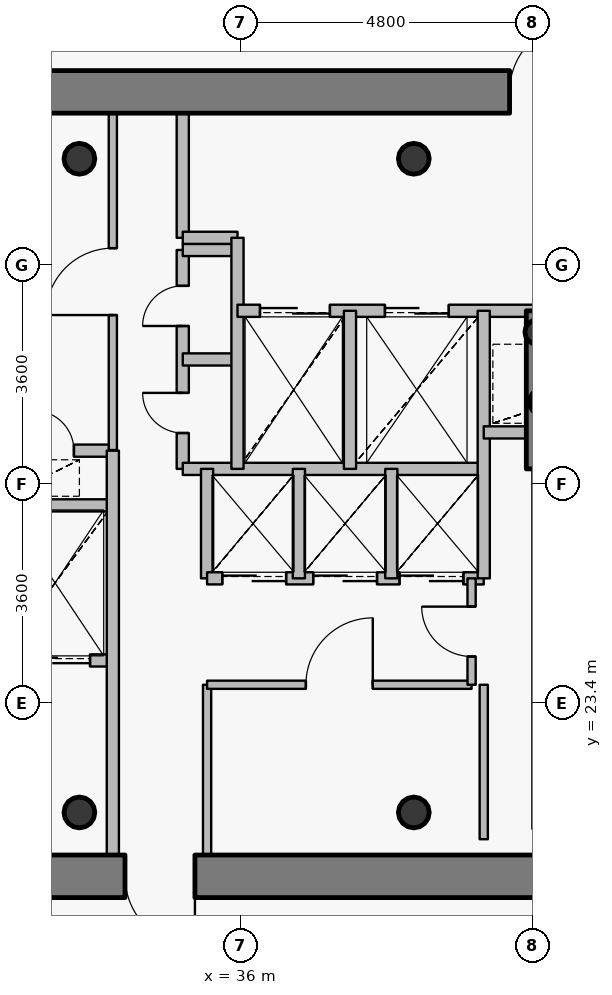
"""IFC4 building model, lengths in metres.
Left out: names, types, materials, properties, quantities, classifications, styles, units other than length and angle.
Written with IfcOpenShell. Run it as: python <this file> out.ifc"""

import sys

from ifc_helpers import new_model, si_unit, direction, frame, frame_2d, origin, origin_2d, place, context, subcontext, project, spatial, rectangle, hollow_circle, extrude, source, transform, mapped, element, fill, save


model = new_model("IFC4")
c1 = context("Model", 3, precision=1e-05, world=origin(), true_north=direction((0.0, 1.0)))
c2 = subcontext(c1, "Body", "Model", "MODEL_VIEW")
j1 = project(units=[si_unit("LENGTHUNIT", "METRE"), si_unit("PLANEANGLEUNIT", "RADIAN")], contexts=[c1])
p1 = place(None, origin())
s1 = spatial("IfcSite", under=j1, at=p1, CompositionType="ELEMENT")
p2 = place(p1, origin())
s2 = spatial("IfcBuilding", under=s1, at=p2, CompositionType="ELEMENT")
p3 = place(p2, frame((0.0, 0.0, 291.75)))
s3 = spatial("IfcBuildingStorey", under=s2, at=p3, CompositionType="ELEMENT", Elevation=291.75)
for number, where, z_axis, x_axis in (
    (1, (33.35, 21.6, 0.0), (0.0, 0.0, 1.0), (1.0, 0.0, 0.0)),
    (2, (38.85, 21.6, 0.0), (0.0, 0.0, 1.0), (1.0, 0.0, 0.0)),
    (3, (38.85, 32.35, 0.0), (0.0, 0.0, 1.0), (1.0, 0.0, 0.0)),
    (4, (33.35, 32.35, 0.0), (0.0, 0.0, 1.0), (1.0, 0.0, 0.0)),
):
    element("IfcColumn", number, at=place(p3, frame(where, z_axis=z_axis, x_axis=x_axis)), inside=s3, PredefinedType="COLUMN", context=c2, shape_type="SweptSolid", body=[
        extrude(hollow_circle(Radius=0.254, WallThickness=0.02, at=origin_2d()), origin(), (0.0, 0.0, 1.0), 3.75),
    ])
for number, where, z_axis, x_axis in (
    (5, (40.95, 28.35, 0.0), (0.0, 0.0, 1.0), (1.0, 0.0, 0.0)),
    (6, (40.88, 29.5, 0.0), (0.0, 0.0, 1.0), (1.0, 0.0, 0.0)),
):
    element("IfcColumn", number, at=place(p3, frame(where, z_axis=z_axis, x_axis=x_axis)), inside=s3, PredefinedType="COLUMN", context=c2, shape_type="SweptSolid", body=[
        extrude(hollow_circle(Radius=0.203, WallThickness=0.016, at=origin_2d()), origin(), (0.0, 0.0, 1.0), 3.75),
    ])
p4 = place(p3, frame((27.65, 33.45, 0.0), z_axis=(0.0, 0.0, 1.0), x_axis=(1.0, 0.0, 0.0)))
e7 = element("IfcWall", 7, at=p4, inside=s3, PredefinedType="SHEAR", context=c2, shape_type="SweptSolid", body=[
    extrude(rectangle(XDim=16.7, YDim=0.7, at=frame_2d((8.35, 0.0))), origin(), (0.0, 0.0, 1.0), 3.05),
])
p5 = place(p4, frame((12.775, 0.0, 0.0)))
e8 = element("IfcOpeningElement", 8, at=p5, cuts=e7, PredefinedType="OPENING", context=c2, shape_type="SweptSolid", body=[
    extrude(rectangle(XDim=1.15, YDim=2.15, at=origin_2d()), frame((0.575, 0.36, 1.075), z_axis=(0.0, -1.0, 0.0), x_axis=(1.0, 0.0, 0.0)), (0.0, 0.0, 1.0), 0.72),
])
p6 = place(p3, frame((44.35, 20.55, 0.0), z_axis=(0.0, 0.0, 1.0), x_axis=(-1.0, 0.0, 0.0)))
e9 = element("IfcWall", 9, at=p6, inside=s3, PredefinedType="SHEAR", context=c2, shape_type="SweptSolid", body=[
    extrude(rectangle(XDim=16.7, YDim=0.7, at=frame_2d((8.35, 0.0))), origin(), (0.0, 0.0, 1.0), 3.05),
])
p7 = place(p6, frame((12.925, 0.0, 0.0)))
e10 = element("IfcOpeningElement", 10, at=p7, cuts=e9, PredefinedType="OPENING", context=c2, shape_type="SweptSolid", body=[
    extrude(rectangle(XDim=1.15, YDim=2.15, at=origin_2d()), frame((0.575, 0.36, 1.075), z_axis=(0.0, -1.0, 0.0), x_axis=(1.0, 0.0, 0.0)), (0.0, 0.0, 1.0), 0.72),
])
p8 = place(p6, frame((9.1, 0.0, 0.0)))
e11 = element("IfcOpeningElement", 11, at=p8, cuts=e9, PredefinedType="OPENING", context=c2, shape_type="SweptSolid", body=[
    extrude(rectangle(XDim=1.15, YDim=2.15, at=origin_2d()), frame((0.575, 0.36, 1.075), z_axis=(0.0, -1.0, 0.0), x_axis=(1.0, 0.0, 0.0)), (0.0, 0.0, 1.0), 0.72),
])
p9 = place(p3, frame((40.9, 27.25, 0.0), z_axis=(0.0, 0.0, 1.0), x_axis=(0.0, 1.0, 0.0)))
e12 = element("IfcWall", 12, at=p9, inside=s3, PredefinedType="SHEAR", context=c2, shape_type="SweptSolid", body=[
    extrude(rectangle(XDim=2.6, YDim=0.4, at=frame_2d((1.3, 0.0))), origin(), (0.0, 0.0, 1.0), 3.1),
])
p10 = place(p3, frame((31.1, 27.55, 0.0), z_axis=(0.0, 0.0, 1.0), x_axis=(1.0, 0.0, 0.0)))
e13 = element("IfcWall", 13, at=p10, inside=s3, PredefinedType="PARTITIONING", context=c2, shape_type="SweptSolid", body=[
    extrude(rectangle(XDim=2.8, YDim=0.2, at=frame_2d((1.4, 0.0))), origin(), (0.0, 0.0, 1.0), 3.085),
])
p11 = place(p10, frame((1.5, 0.0, 0.0)))
e14 = element("IfcOpeningElement", 14, at=p11, cuts=e13, PredefinedType="OPENING", context=c2, shape_type="SweptSolid", body=[
    extrude(rectangle(XDim=0.66, YDim=2.05, at=origin_2d()), frame((0.33, 0.11, 1.025), z_axis=(0.0, -1.0, 0.0), x_axis=(1.0, 0.0, 0.0)), (0.0, 0.0, 1.0), 0.22),
])
p12 = place(p3, frame((32.0, 24.1, 0.0), z_axis=(0.0, 0.0, 1.0), x_axis=(1.0, 0.0, 0.0)))
e15 = element("IfcWall", 15, at=p12, inside=s3, PredefinedType="PARTITIONING", context=c2, shape_type="SweptSolid", body=[
    extrude(rectangle(XDim=1.9, YDim=0.2, at=frame_2d((0.95, 0.0))), origin(), (0.0, 0.0, 1.0), 3.085),
])
p13 = place(p12, frame((0.375, 0.0, 0.0)))
e16 = element("IfcOpeningElement", 16, at=p13, cuts=e15, PredefinedType="OPENING", context=c2, shape_type="SweptSolid", body=[
    extrude(rectangle(XDim=1.15, YDim=2.15, at=origin_2d()), frame((0.575, 0.11, 1.075), z_axis=(0.0, -1.0, 0.0), x_axis=(1.0, 0.0, 0.0)), (0.0, 0.0, 1.0), 0.22),
])
p14 = place(p3, frame((32.0, 26.65, 0.0), z_axis=(0.0, 0.0, 1.0), x_axis=(1.0, 0.0, 0.0)))
e17 = element("IfcWall", 17, at=p14, inside=s3, PredefinedType="PARTITIONING", context=c2, shape_type="SweptSolid", body=[
    extrude(rectangle(XDim=1.9, YDim=0.2, at=frame_2d((0.95, 0.0))), origin(), (0.0, 0.0, 1.0), 3.085),
])
p15 = place(p3, frame((33.9, 20.9, 0.0), z_axis=(0.0, 0.0, 1.0), x_axis=(0.0, 1.0, 0.0)))
e18 = element("IfcWall", 18, at=p15, inside=s3, PredefinedType="PARTITIONING", context=c2, shape_type="SweptSolid", body=[
    extrude(rectangle(XDim=6.65, YDim=0.2, at=frame_2d((3.325, 0.0))), origin(), (0.0, 0.0, 1.0), 3.085),
])
p16 = place(p3, frame((33.9, 27.56, 0.0), z_axis=(0.0, 0.0, 1.0), x_axis=(0.0, 1.0, 0.0)))
e19 = element("IfcWall", 19, at=p16, inside=s3, PredefinedType="PARTITIONING", context=c2, shape_type="SweptSolid", body=[
    extrude(rectangle(XDim=5.54, YDim=0.135, at=frame_2d((2.77, 0.0))), origin(), (0.0, 0.0, 1.0), 3.085),
])
p17 = place(p16, frame((2.22, 0.0, 0.0)))
e20 = element("IfcOpeningElement", 20, at=p17, cuts=e19, PredefinedType="OPENING", context=c2, shape_type="SweptSolid", body=[
    extrude(rectangle(XDim=1.1, YDim=2.15, at=origin_2d()), frame((0.55, 0.078, 1.075), z_axis=(0.0, -1.0, 0.0), x_axis=(1.0, 0.0, 0.0)), (0.0, 0.0, 1.0), 0.155),
])
p18 = place(p3, frame((35.05, 27.25, 0.0), z_axis=(0.0, 0.0, 1.0), x_axis=(0.0, 1.0, 0.0)))
e21 = element("IfcWall", 21, at=p18, inside=s3, PredefinedType="PARTITIONING", context=c2, shape_type="SweptSolid", body=[
    extrude(rectangle(XDim=3.6, YDim=0.2, at=frame_2d((1.8, 0.0))), origin(), (0.0, 0.0, 1.0), 3.5),
])
p19 = place(p18, frame((0.59, 0.0, 0.0)))
e22 = element("IfcOpeningElement", 22, at=p19, cuts=e21, PredefinedType="OPENING", context=c2, shape_type="SweptSolid", body=[
    extrude(rectangle(XDim=0.66, YDim=2.05, at=origin_2d()), frame((0.33, 0.11, 1.025), z_axis=(0.0, -1.0, 0.0), x_axis=(1.0, 0.0, 0.0)), (0.0, 0.0, 1.0), 0.22),
])
p20 = place(p18, frame((2.35, 0.0, 0.0)))
e23 = element("IfcOpeningElement", 23, at=p20, cuts=e21, PredefinedType="OPENING", context=c2, shape_type="SweptSolid", body=[
    extrude(rectangle(XDim=0.66, YDim=2.05, at=origin_2d()), frame((0.33, 0.11, 1.025), z_axis=(0.0, -1.0, 0.0), x_axis=(1.0, 0.0, 0.0)), (0.0, 0.0, 1.0), 0.22),
])
p21 = place(p3, frame((35.05, 27.25, 0.0), z_axis=(0.0, 0.0, 1.0), x_axis=(1.0, 0.0, 0.0)))
e24 = element("IfcWall", 24, at=p21, inside=s3, PredefinedType="PARTITIONING", context=c2, shape_type="SweptSolid", body=[
    extrude(rectangle(XDim=4.95, YDim=0.2, at=frame_2d((2.475, 0.0))), origin(), (0.0, 0.0, 1.0), 3.085),
])
for number, where, z_axis, x_axis in (
    (25, (35.05, 29.05, 0.0), (0.0, 0.0, 1.0), (1.0, 0.0, 0.0)),
    (26, (35.05, 30.85, 0.0), (0.0, 0.0, 1.0), (1.0, 0.0, 0.0)),
):
    element("IfcWall", number, at=place(p3, frame(where, z_axis=z_axis, x_axis=x_axis)), inside=s3, PredefinedType="PARTITIONING", context=c2, shape_type="SweptSolid", body=[
        extrude(rectangle(XDim=0.9, YDim=0.2, at=frame_2d((0.45, 0.0))), origin(), (0.0, 0.0, 1.0), 3.5),
    ])
p22 = place(p3, frame((35.05, 31.05, 0.0), z_axis=(0.0, 0.0, 1.0), x_axis=(0.0, 1.0, 0.0)))
e27 = element("IfcWall", 27, at=p22, inside=s3, PredefinedType="PARTITIONING", context=c2, shape_type="SweptSolid", body=[
    extrude(rectangle(XDim=2.05, YDim=0.2, at=frame_2d((1.025, 0.0))), origin(), (0.0, 0.0, 1.0), 3.085),
])
p23 = place(p3, frame((35.05, 31.05, 0.0), z_axis=(0.0, 0.0, 1.0), x_axis=(1.0, 0.0, 0.0)))
e28 = element("IfcWall", 28, at=p23, inside=s3, PredefinedType="PARTITIONING", context=c2, shape_type="SweptSolid", body=[
    extrude(rectangle(XDim=0.9, YDim=0.2, at=frame_2d((0.45, 0.0))), origin(), (0.0, 0.0, 1.0), 3.5),
])
p24 = place(p3, frame((35.45, 20.9, 0.0), z_axis=(0.0, 0.0, 1.0), x_axis=(0.0, 1.0, 0.0)))
e29 = element("IfcWall", 29, at=p24, inside=s3, PredefinedType="PARTITIONING", context=c2, shape_type="SweptSolid", body=[
    extrude(rectangle(XDim=2.8, YDim=0.135, at=frame_2d((1.4, 0.0))), origin(), (0.0, 0.0, 1.0), 3.085),
])
p25 = place(p3, frame((35.45, 23.7, 0.0), z_axis=(0.0, 0.0, 1.0), x_axis=(1.0, 0.0, 0.0)))
e30 = element("IfcWall", 30, at=p25, inside=s3, PredefinedType="PARTITIONING", context=c2, shape_type="SweptSolid", body=[
    extrude(rectangle(XDim=4.35, YDim=0.135, at=frame_2d((2.175, 0.0))), origin(), (0.0, 0.0, 1.0), 3.085),
])
p26 = place(p25, frame((1.625, 0.0, 0.0)))
e31 = element("IfcOpeningElement", 31, at=p26, cuts=e30, PredefinedType="OPENING", context=c2, shape_type="SweptSolid", body=[
    extrude(rectangle(XDim=1.1, YDim=2.15, at=origin_2d()), frame((0.55, 0.078, 1.075), z_axis=(0.0, -1.0, 0.0), x_axis=(1.0, 0.0, 0.0)), (0.0, 0.0, 1.0), 0.155),
])
p27 = place(p3, frame((35.45, 25.45, 0.0), z_axis=(0.0, 0.0, 1.0), x_axis=(0.0, 1.0, 0.0)))
e32 = element("IfcWall", 32, at=p27, inside=s3, PredefinedType="PARTITIONING", context=c2, shape_type="SweptSolid", body=[
    extrude(rectangle(XDim=1.8, YDim=0.2, at=frame_2d((0.9, 0.0))), origin(), (0.0, 0.0, 1.0), 3.5),
])
p28 = place(p3, frame((35.45, 25.45, 0.0), z_axis=(0.0, 0.0, 1.0), x_axis=(1.0, 0.0, 0.0)))
e33 = element("IfcWall", 33, at=p28, inside=s3, PredefinedType="PARTITIONING", context=c2, shape_type="SweptSolid", body=[
    extrude(rectangle(XDim=4.55, YDim=0.2, at=frame_2d((2.275, 0.0))), origin(), (0.0, 0.0, 1.0), 3.085),
])
p29 = place(p28, frame((0.25, 0.0, 0.0)))
e34 = element("IfcOpeningElement", 34, at=p29, cuts=e33, PredefinedType="OPENING", context=c2, shape_type="SweptSolid", body=[
    extrude(rectangle(XDim=1.05, YDim=2.15, at=origin_2d()), frame((0.525, 0.11, 1.075), z_axis=(0.0, -1.0, 0.0), x_axis=(1.0, 0.0, 0.0)), (0.0, 0.0, 1.0), 0.22),
])
p30 = place(p28, frame((1.745, 0.0, 0.0)))
e35 = element("IfcOpeningElement", 35, at=p30, cuts=e33, PredefinedType="OPENING", context=c2, shape_type="SweptSolid", body=[
    extrude(rectangle(XDim=1.05, YDim=2.15, at=origin_2d()), frame((0.525, 0.11, 1.075), z_axis=(0.0, -1.0, 0.0), x_axis=(1.0, 0.0, 0.0)), (0.0, 0.0, 1.0), 0.22),
])
p31 = place(p28, frame((3.165, 0.0, 0.0)))
e36 = element("IfcOpeningElement", 36, at=p31, cuts=e33, PredefinedType="OPENING", context=c2, shape_type="SweptSolid", body=[
    extrude(rectangle(XDim=1.05, YDim=2.15, at=origin_2d()), frame((0.525, 0.11, 1.075), z_axis=(0.0, -1.0, 0.0), x_axis=(1.0, 0.0, 0.0)), (0.0, 0.0, 1.0), 0.22),
])
p32 = place(p3, frame((35.95, 27.25, 0.0), z_axis=(0.0, 0.0, 1.0), x_axis=(0.0, 1.0, 0.0)))
e37 = element("IfcWall", 37, at=p32, inside=s3, PredefinedType="PARTITIONING", context=c2, shape_type="SweptSolid", body=[
    extrude(rectangle(XDim=3.8, YDim=0.2, at=frame_2d((1.9, 0.0))), origin(), (0.0, 0.0, 1.0), 3.5),
])
p33 = place(p3, frame((35.95, 29.85, 0.0), z_axis=(0.0, 0.0, 1.0), x_axis=(1.0, 0.0, 0.0)))
e38 = element("IfcWall", 38, at=p33, inside=s3, PredefinedType="PARTITIONING", context=c2, shape_type="SweptSolid", body=[
    extrude(rectangle(XDim=8.49, YDim=0.2, at=frame_2d((4.245, 0.0))), origin(), (0.0, 0.0, 1.0), 3.085),
])
p34 = place(p33, frame((6.1, 0.0, 0.0)))
e39 = element("IfcOpeningElement", 39, at=p34, cuts=e38, PredefinedType="OPENING", context=c2, shape_type="SweptSolid", body=[
    extrude(rectangle(XDim=1.2, YDim=2.15, at=origin_2d()), frame((0.6, 0.11, 1.075), z_axis=(0.0, -1.0, 0.0), x_axis=(1.0, 0.0, 0.0)), (0.0, 0.0, 1.0), 0.22),
])
p35 = place(p33, frame((0.37, 0.0, 0.0)))
e40 = element("IfcOpeningElement", 40, at=p35, cuts=e38, PredefinedType="OPENING", context=c2, shape_type="SweptSolid", body=[
    extrude(rectangle(XDim=1.15, YDim=2.15, at=origin_2d()), frame((0.575, 0.11, 1.075), z_axis=(0.0, -1.0, 0.0), x_axis=(1.0, 0.0, 0.0)), (0.0, 0.0, 1.0), 0.22),
])
p36 = place(p33, frame((2.425, 0.0, 0.0)))
e41 = element("IfcOpeningElement", 41, at=p36, cuts=e38, PredefinedType="OPENING", context=c2, shape_type="SweptSolid", body=[
    extrude(rectangle(XDim=1.05, YDim=2.15, at=origin_2d()), frame((0.525, 0.11, 1.075), z_axis=(0.0, -1.0, 0.0), x_axis=(1.0, 0.0, 0.0)), (0.0, 0.0, 1.0), 0.22),
])
p37 = place(p3, frame((36.96, 25.45, 0.0), z_axis=(0.0, 0.0, 1.0), x_axis=(0.0, 1.0, 0.0)))
e42 = element("IfcWall", 42, at=p37, inside=s3, PredefinedType="PARTITIONING", context=c2, shape_type="SweptSolid", body=[
    extrude(rectangle(XDim=1.8, YDim=0.2, at=frame_2d((0.9, 0.0))), origin(), (0.0, 0.0, 1.0), 3.5),
])
p38 = place(p3, frame((37.8, 27.25, 0.0), z_axis=(0.0, 0.0, 1.0), x_axis=(0.0, 1.0, 0.0)))
e43 = element("IfcWall", 43, at=p38, inside=s3, PredefinedType="PARTITIONING", context=c2, shape_type="SweptSolid", body=[
    extrude(rectangle(XDim=2.6, YDim=0.2, at=frame_2d((1.3, 0.0))), origin(), (0.0, 0.0, 1.0), 3.5),
])
p39 = place(p3, frame((38.48, 25.45, 0.0), z_axis=(0.0, 0.0, 1.0), x_axis=(0.0, 1.0, 0.0)))
e44 = element("IfcWall", 44, at=p39, inside=s3, PredefinedType="PARTITIONING", context=c2, shape_type="SweptSolid", body=[
    extrude(rectangle(XDim=1.8, YDim=0.2, at=frame_2d((0.9, 0.0))), origin(), (0.0, 0.0, 1.0), 3.5),
])
p40 = place(p3, frame((39.8, 23.7, 0.0), z_axis=(0.0, 0.0, 1.0), x_axis=(0.0, 1.0, 0.0)))
e45 = element("IfcWall", 45, at=p40, inside=s3, PredefinedType="PARTITIONING", context=c2, shape_type="SweptSolid", body=[
    extrude(rectangle(XDim=1.75, YDim=0.135, at=frame_2d((0.875, 0.0))), origin(), (0.0, 0.0, 1.0), 3.5),
])
p41 = place(p40, frame((0.465, 0.0, 0.0)))
e46 = element("IfcOpeningElement", 46, at=p41, cuts=e45, PredefinedType="OPENING", context=c2, shape_type="SweptSolid", body=[
    extrude(rectangle(XDim=0.82, YDim=2.1, at=origin_2d()), frame((0.41, 0.078, 1.05), z_axis=(0.0, -1.0, 0.0), x_axis=(1.0, 0.0, 0.0)), (0.0, 0.0, 1.0), 0.155),
])
p42 = place(p3, frame((40.0, 25.45, 0.0), z_axis=(0.0, 0.0, 1.0), x_axis=(0.0, 1.0, 0.0)))
e47 = element("IfcWall", 47, at=p42, inside=s3, PredefinedType="PARTITIONING", context=c2, shape_type="SweptSolid", body=[
    extrude(rectangle(XDim=4.4, YDim=0.2, at=frame_2d((2.2, 0.0))), origin(), (0.0, 0.0, 1.0), 3.5),
])
p43 = place(p3, frame((40.0, 27.85, 0.0), z_axis=(0.0, 0.0, 1.0), x_axis=(1.0, 0.0, 0.0)))
e48 = element("IfcWall", 48, at=p43, inside=s3, PredefinedType="PARTITIONING", context=c2, shape_type="SweptSolid", body=[
    extrude(rectangle(XDim=0.9, YDim=0.2, at=frame_2d((0.45, 0.0))), origin(), (0.0, 0.0, 1.0), 3.5),
])
p44 = place(p3, frame((40.9, 21.33, 0.0), z_axis=(0.0, 0.0, 1.0), x_axis=(0.0, 1.0, 0.0)))
e49 = element("IfcWall", 49, at=p44, inside=s3, PredefinedType="PARTITIONING", context=c2, shape_type="SweptSolid", body=[
    extrude(rectangle(XDim=5.91, YDim=0.2, at=frame_2d((2.955, 0.0))), origin(), (0.0, 0.0, 1.0), 3.035),
])
p45 = place(p3, frame((40.0, 23.7, 0.0), z_axis=(0.0, 0.0, 1.0), x_axis=(0.0, -1.0, 0.0)))
e50 = element("IfcWall", 50, at=p45, inside=s3, PredefinedType="PARTITIONING", context=c2, shape_type="SweptSolid", body=[
    extrude(rectangle(XDim=2.54, YDim=0.135, at=frame_2d((1.27, 0.0))), origin(), (0.0, 0.0, 1.0), 3.035),
])
m1 = source(origin(), c2, "Body", "SweptSolid", [
    extrude(rectangle(XDim=1.15, YDim=2.15, at=origin_2d()), frame((0.575, 0.025, 1.075), z_axis=(0.0, -1.0, 0.0), x_axis=(1.0, 0.0, 0.0)), (0.0, 0.0, 1.0), 0.05),
])
p46 = place(p5, origin())
e51 = element("IfcDoor", 51, at=p46, inside=s3, OperationType="SINGLE_SWING_RIGHT", PredefinedType="DOOR", context=c2, shape_type="MappedRepresentation", body=[
    mapped(m1, transform((0.0, 0.0, 0.0), x_axis=(1.0, 0.0, 0.0), y_axis=(0.0, 1.0, 0.0), z_axis=(0.0, 0.0, 1.0), scale=1.0)),
])
fill(e8, e51)
p47 = place(p8, origin())
e52 = element("IfcDoor", 52, at=p47, inside=s3, OperationType="SINGLE_SWING_LEFT", PredefinedType="DOOR", context=c2, shape_type="MappedRepresentation", body=[
    mapped(m1, transform((0.0, 0.0, 0.0), x_axis=(1.0, 0.0, 0.0), y_axis=(0.0, 1.0, 0.0), z_axis=(0.0, 0.0, 1.0), scale=1.0)),
])
fill(e11, e52)
m2 = source(origin(), c2, "Body", "SweptSolid", [
    extrude(rectangle(XDim=1.15, YDim=2.15, at=origin_2d()), frame((0.575, 0.025, 1.075), z_axis=(0.0, -1.0, 0.0), x_axis=(1.0, 0.0, 0.0)), (0.0, 0.0, 1.0), 0.05),
])
p48 = place(p35, origin())
e53 = element("IfcDoor", 53, at=p48, inside=s3, OperationType="DOUBLE_DOOR_SLIDING", PredefinedType="USERDEFINED", context=c2, shape_type="MappedRepresentation", body=[
    mapped(m2, transform((0.0, 0.0, 0.0), x_axis=(1.0, 0.0, 0.0), y_axis=(0.0, 1.0, 0.0), z_axis=(0.0, 0.0, 1.0), scale=1.0)),
])
fill(e40, e53)
p49 = place(p13, origin())
e54 = element("IfcDoor", 54, at=p49, inside=s3, OperationType="DOUBLE_DOOR_SLIDING", PredefinedType="USERDEFINED", context=c2, shape_type="MappedRepresentation", body=[
    mapped(m2, transform((0.0, 0.0, 0.0), x_axis=(1.0, 0.0, 0.0), y_axis=(0.0, 1.0, 0.0), z_axis=(0.0, 0.0, 1.0), scale=1.0)),
])
fill(e16, e54)
m3 = source(origin(), c2, "Body", "SweptSolid", [
    extrude(rectangle(XDim=1.05, YDim=2.15, at=origin_2d()), frame((0.525, 0.025, 1.075), z_axis=(0.0, -1.0, 0.0), x_axis=(1.0, 0.0, 0.0)), (0.0, 0.0, 1.0), 0.05),
])
p50 = place(p36, origin())
e55 = element("IfcDoor", 55, at=p50, inside=s3, OperationType="DOUBLE_DOOR_SLIDING", PredefinedType="USERDEFINED", context=c2, shape_type="MappedRepresentation", body=[
    mapped(m3, transform((0.0, 0.0, 0.0), x_axis=(1.0, 0.0, 0.0), y_axis=(0.0, 1.0, 0.0), z_axis=(0.0, 0.0, 1.0), scale=1.0)),
])
fill(e41, e55)
p51 = place(p29, origin())
e56 = element("IfcDoor", 56, at=p51, inside=s3, OperationType="DOUBLE_DOOR_SLIDING", PredefinedType="USERDEFINED", context=c2, shape_type="MappedRepresentation", body=[
    mapped(m3, transform((0.0, 0.0, 0.0), x_axis=(1.0, 0.0, 0.0), y_axis=(0.0, 1.0, 0.0), z_axis=(0.0, 0.0, 1.0), scale=1.0)),
])
fill(e34, e56)
p52 = place(p30, origin())
e57 = element("IfcDoor", 57, at=p52, inside=s3, OperationType="DOUBLE_DOOR_SLIDING", PredefinedType="USERDEFINED", context=c2, shape_type="MappedRepresentation", body=[
    mapped(m3, transform((0.0, 0.0, 0.0), x_axis=(1.0, 0.0, 0.0), y_axis=(0.0, 1.0, 0.0), z_axis=(0.0, 0.0, 1.0), scale=1.0)),
])
fill(e35, e57)
p53 = place(p31, origin())
e58 = element("IfcDoor", 58, at=p53, inside=s3, OperationType="DOUBLE_DOOR_SLIDING", PredefinedType="USERDEFINED", context=c2, shape_type="MappedRepresentation", body=[
    mapped(m3, transform((0.0, 0.0, 0.0), x_axis=(1.0, 0.0, 0.0), y_axis=(0.0, 1.0, 0.0), z_axis=(0.0, 0.0, 1.0), scale=1.0)),
])
fill(e36, e58)
m4 = source(origin(), c2, "Body", "SweptSolid", [
    extrude(rectangle(XDim=0.66, YDim=2.05, at=origin_2d()), frame((0.33, 0.025, 1.025), z_axis=(0.0, -1.0, 0.0), x_axis=(1.0, 0.0, 0.0)), (0.0, 0.0, 1.0), 0.05),
])
p54 = place(p19, origin())
e59 = element("IfcDoor", 59, at=p54, inside=s3, OperationType="SINGLE_SWING_RIGHT", PredefinedType="USERDEFINED", context=c2, shape_type="MappedRepresentation", body=[
    mapped(m4, transform((0.0, 0.0, 0.0), x_axis=(1.0, 0.0, 0.0), y_axis=(0.0, 1.0, 0.0), z_axis=(0.0, 0.0, 1.0), scale=1.0)),
])
fill(e22, e59)
p55 = place(p20, origin())
e60 = element("IfcDoor", 60, at=p55, inside=s3, OperationType="SINGLE_SWING_LEFT", PredefinedType="USERDEFINED", context=c2, shape_type="MappedRepresentation", body=[
    mapped(m4, transform((0.0, 0.0, 0.0), x_axis=(1.0, 0.0, 0.0), y_axis=(0.0, 1.0, 0.0), z_axis=(0.0, 0.0, 1.0), scale=1.0)),
])
fill(e23, e60)
m5 = source(origin(), c2, "Body", "SweptSolid", [
    extrude(rectangle(XDim=1.1, YDim=2.15, at=origin_2d()), frame((0.55, 0.025, 1.075), z_axis=(0.0, -1.0, 0.0), x_axis=(1.0, 0.0, 0.0)), (0.0, 0.0, 1.0), 0.05),
])
p56 = place(p26, origin())
e61 = element("IfcDoor", 61, at=p56, inside=s3, OperationType="SINGLE_SWING_RIGHT", PredefinedType="DOOR", context=c2, shape_type="MappedRepresentation", body=[
    mapped(m5, transform((0.0, 0.0, 0.0), x_axis=(1.0, 0.0, 0.0), y_axis=(0.0, 1.0, 0.0), z_axis=(0.0, 0.0, 1.0), scale=1.0)),
])
fill(e31, e61)
p57 = place(p17, origin())
e62 = element("IfcDoor", 62, at=p57, inside=s3, OperationType="SINGLE_SWING_LEFT", PredefinedType="DOOR", context=c2, shape_type="MappedRepresentation", body=[
    mapped(m5, transform((0.0, 0.0, 0.0), x_axis=(1.0, 0.0, 0.0), y_axis=(0.0, 1.0, 0.0), z_axis=(0.0, 0.0, 1.0), scale=1.0)),
])
fill(e20, e62)
m6 = source(origin(), c2, "Body", "SweptSolid", [
    extrude(rectangle(XDim=0.82, YDim=2.1, at=origin_2d()), frame((0.41, 0.025, 1.05), z_axis=(0.0, -1.0, 0.0), x_axis=(1.0, 0.0, 0.0)), (0.0, 0.0, 1.0), 0.05),
])
p58 = place(p41, origin())
e63 = element("IfcDoor", 63, at=p58, inside=s3, OperationType="SINGLE_SWING_RIGHT", PredefinedType="DOOR", context=c2, shape_type="MappedRepresentation", body=[
    mapped(m6, transform((0.0, 0.0, 0.0), x_axis=(1.0, 0.0, 0.0), y_axis=(0.0, 1.0, 0.0), z_axis=(0.0, 0.0, 1.0), scale=1.0)),
])
fill(e46, e63)
p59 = place(p11, origin())
e64 = element("IfcDoor", 64, at=p59, inside=s3, OperationType="SINGLE_SWING_LEFT", PredefinedType="USERDEFINED", context=c2, shape_type="MappedRepresentation", body=[
    mapped(m4, transform((0.0, 0.0, 0.0), x_axis=(1.0, 0.0, 0.0), y_axis=(0.0, 1.0, 0.0), z_axis=(0.0, 0.0, 1.0), scale=1.0)),
])
fill(e14, e64)
save(model, sys.argv[1])
